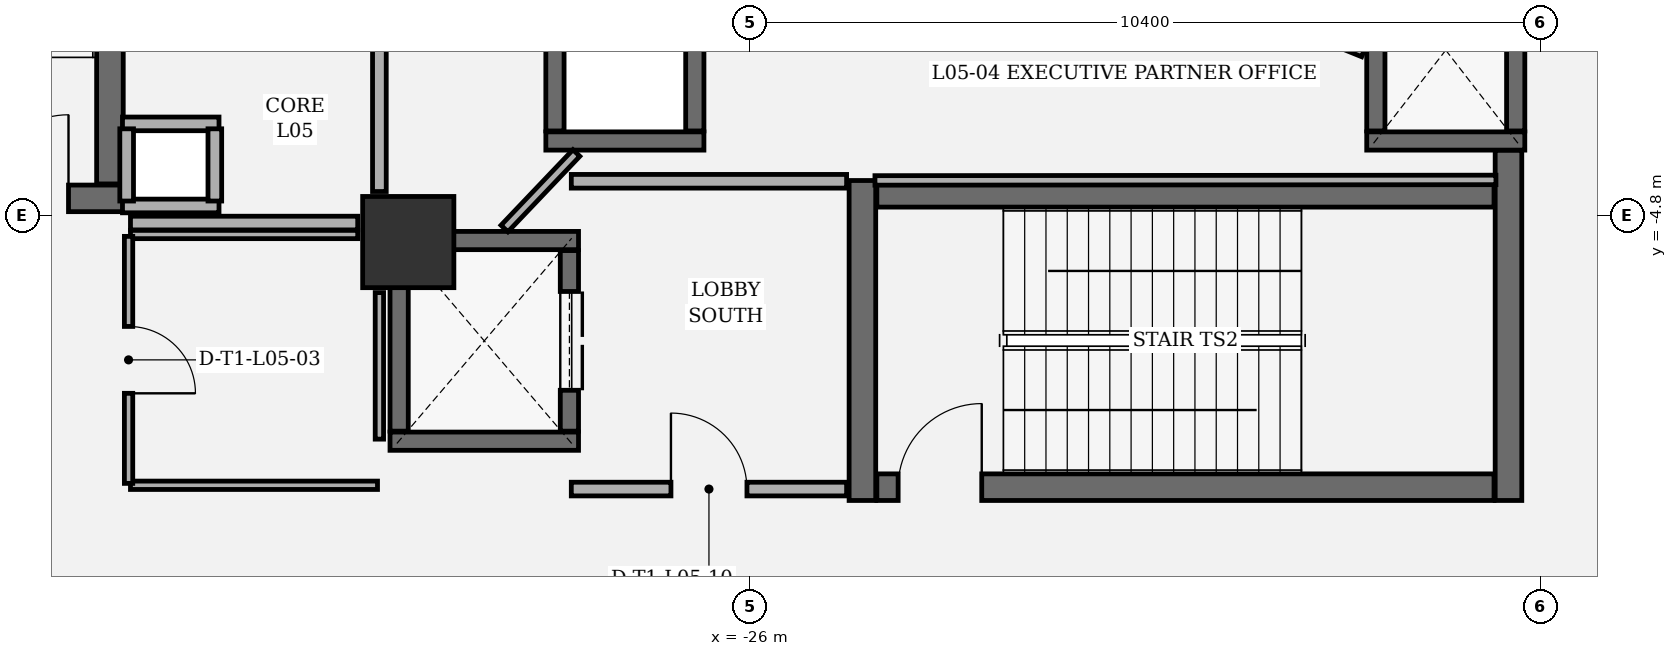
"""IFC4 building model, lengths in metres.
Left out: names, types, materials, properties, quantities, classifications, styles, units other than length and angle.
Written with IfcOpenShell. Run it as: python <this file> out.ifc"""

import sys

from ifc_helpers import new_model, si_unit, direction, frame, frame_2d, origin, origin_2d, place, context, subcontext, project, spatial, rectangle, extrude, element, fill, save


model = new_model("IFC4")
c1 = context("Model", 3, precision=1e-05, world=origin(), true_north=direction((0.0, 1.0)))
c2 = subcontext(c1, "Body", "Model", "MODEL_VIEW")
j1 = project(units=[si_unit("LENGTHUNIT", "METRE"), si_unit("PLANEANGLEUNIT", "RADIAN")], contexts=[c1])
p1 = place(None, origin())
s1 = spatial("IfcSite", under=j1, at=p1, CompositionType="ELEMENT")
p2 = place(p1, origin())
s2 = spatial("IfcBuilding", under=s1, at=p2, CompositionType="ELEMENT")
p3 = place(p2, frame((0.0, 0.0, 27.0)))
s3 = spatial("IfcBuildingStorey", under=s2, at=p3, CompositionType="ELEMENT", Elevation=27.0)
p4 = place(p3, frame((-30.5, -5.15, 0.0), z_axis=(0.0, 0.0, 1.0), x_axis=(1.0, 0.0, 0.0)))
e1 = element("IfcColumn", 1, at=p4, inside=s3, PredefinedType="COLUMN", context=c2, shape_type="SweptSolid", body=[
    extrude(rectangle(XDim=1.2, YDim=1.2, at=origin_2d()), origin(), (0.0, 0.0, 1.0), 5.4),
])
p5 = place(p3, frame((-13.635, -37.094, 0.0), z_axis=(0.0, 0.0, 1.0), x_axis=(-0.842602364841, 0.538536214905, 0.0)))
e2 = element("IfcWall", 2, at=p5, inside=s3, PredefinedType="SOLIDWALL", context=c2, shape_type="SweptSolid", body=[
    extrude(rectangle(XDim=60.27, YDim=0.38, at=frame_2d((30.135, 0.0))), origin(), (0.0, 0.0, 1.0), 5.12),
])
p6 = place(p5, frame((29.435, 0.0, 0.8)))
e3 = element("IfcOpeningElement", 3, at=p6, cuts=e2, PredefinedType="OPENING", context=c2, shape_type="SweptSolid", body=[
    extrude(rectangle(XDim=1.4, YDim=1.5, at=frame_2d((0.7, 0.75))), frame((0.0, 0.2, 0.0), z_axis=(0.0, -1.0, 0.0), x_axis=(1.0, 0.0, 0.0)), (0.0, 0.0, 1.0), 0.4),
])
p7 = place(p3, frame((-24.525, -4.34, 0.0), z_axis=(0.0, 0.0, 1.0), x_axis=(0.0, -1.0, 0.0)))
e4 = element("IfcWall", 4, at=p7, inside=s3, PredefinedType="SHEAR", context=c2, shape_type="SweptSolid", body=[
    extrude(rectangle(XDim=4.21, YDim=0.35, at=frame_2d((2.105, 0.0))), origin(), (0.0, 0.0, 1.0), 5.12),
])
p8 = place(p3, frame((-16.025, -8.55, 0.0), z_axis=(0.0, 0.0, 1.0), x_axis=(0.0, 1.0, 0.0)))
e5 = element("IfcWall", 5, at=p8, inside=s3, PredefinedType="SHEAR", context=c2, shape_type="SweptSolid", body=[
    extrude(rectangle(XDim=4.61, YDim=0.35, at=frame_2d((2.305, 0.0))), origin(), (0.0, 0.0, 1.0), 5.12),
])
p9 = place(p3, frame((-24.335, -8.375, 0.0), z_axis=(0.0, 0.0, 1.0), x_axis=(1.0, 0.0, 0.0)))
e6 = element("IfcWall", 6, at=p9, inside=s3, PredefinedType="SHEAR", context=c2, shape_type="SweptSolid", body=[
    extrude(rectangle(XDim=8.12, YDim=0.35, at=frame_2d((4.06, 0.0))), origin(), (0.0, 0.0, 1.0), 5.12),
])
p10 = place(p9, frame((0.28, 0.0, 0.0)))
e7 = element("IfcOpeningElement", 7, at=p10, cuts=e6, PredefinedType="OPENING", context=c2, shape_type="SweptSolid", body=[
    extrude(rectangle(XDim=1.1, YDim=2.2, at=frame_2d((0.55, 1.1))), frame((0.0, 0.185, 0.0), z_axis=(0.0, -1.0, 0.0), x_axis=(1.0, 0.0, 0.0)), (0.0, 0.0, 1.0), 0.37),
])
p11 = place(p3, frame((-16.215, -4.515, 0.0), z_axis=(0.0, 0.0, 1.0), x_axis=(-1.0, 0.0, 0.0)))
e8 = element("IfcWall", 8, at=p11, inside=s3, PredefinedType="SHEAR", context=c2, shape_type="SweptSolid", body=[
    extrude(rectangle(XDim=8.12, YDim=0.35, at=frame_2d((4.06, 0.0))), origin(), (0.0, 0.0, 1.0), 5.12),
])
p12 = place(p3, frame((-38.46, -4.575, 0.0), z_axis=(0.0, 0.0, 1.0), x_axis=(1.0, 0.0, 0.0)))
e9 = element("IfcWall", 9, at=p12, inside=s3, PredefinedType="SHEAR", context=c2, shape_type="SweptSolid", body=[
    extrude(rectangle(XDim=4.21, YDim=0.35, at=frame_2d((2.105, 0.0))), origin(), (0.0, 0.0, 1.0), 5.12),
])
p13 = place(p12, frame((2.39, 0.0, 0.0)))
e10 = element("IfcOpeningElement", 10, at=p13, cuts=e9, PredefinedType="OPENING", context=c2, shape_type="SweptSolid", body=[
    extrude(rectangle(XDim=1.1, YDim=2.2, at=frame_2d((0.55, 1.1))), frame((0.0, 0.185, 0.0), z_axis=(0.0, -1.0, 0.0), x_axis=(1.0, 0.0, 0.0)), (0.0, 0.0, 1.0), 0.37),
])
p14 = place(p3, frame((-34.425, -4.385, 0.0), z_axis=(0.0, 0.0, 1.0), x_axis=(0.0, 1.0, 0.0)))
e11 = element("IfcWall", 11, at=p14, inside=s3, PredefinedType="SHEAR", context=c2, shape_type="SweptSolid", body=[
    extrude(rectangle(XDim=8.77, YDim=0.35, at=frame_2d((4.385, 0.0))), origin(), (0.0, 0.0, 1.0), 5.12),
])
for number, where, z_axis, x_axis in (
    (12, (-28.26, -7.77, 0.0), (0.0, 0.0, 1.0), (-1.0, 0.0, 0.0)),
    (13, (-30.74, -5.13, 0.0), (0.0, 0.0, 1.0), (1.0, 0.0, 0.0)),
):
    element("IfcWall", number, at=place(p3, frame(where, z_axis=z_axis, x_axis=x_axis)), inside=s3, PredefinedType="SHEAR", context=c2, shape_type="SweptSolid", body=[
        extrude(rectangle(XDim=2.48, YDim=0.24, at=frame_2d((1.24, 0.0))), origin(), (0.0, 0.0, 1.0), 5.12),
    ])
p15 = place(p3, frame((-30.62, -7.638, 0.0), z_axis=(0.0, 0.0, 1.0), x_axis=(0.0, 1.0, 0.0)))
e14 = element("IfcWall", 14, at=p15, inside=s3, PredefinedType="SHEAR", context=c2, shape_type="SweptSolid", body=[
    extrude(rectangle(XDim=2.376, YDim=0.24, at=frame_2d((1.188, 0.0))), origin(), (0.0, 0.0, 1.0), 5.12),
])
p16 = place(p3, frame((-28.38, -5.262, 0.0), z_axis=(0.0, 0.0, 1.0), x_axis=(0.0, -1.0, 0.0)))
e15 = element("IfcWall", 15, at=p16, inside=s3, PredefinedType="SHEAR", context=c2, shape_type="SweptSolid", body=[
    extrude(rectangle(XDim=2.376, YDim=0.24, at=frame_2d((1.188, 0.0))), origin(), (0.0, 0.0, 1.0), 5.12),
])
p17 = place(p16, frame((0.538, 0.0, 0.0)))
e16 = element("IfcOpeningElement", 16, at=p17, cuts=e15, PredefinedType="OPENING", context=c2, shape_type="SweptSolid", body=[
    extrude(rectangle(XDim=1.3, YDim=2.3, at=frame_2d((0.65, 1.15))), frame((0.0, 0.13, 0.0), z_axis=(0.0, -1.0, 0.0), x_axis=(1.0, 0.0, 0.0)), (0.0, 0.0, 1.0), 0.26),
])
p18 = place(p3, frame((-26.61, -3.82, 0.0), z_axis=(0.0, 0.0, 1.0), x_axis=(-1.0, 0.0, 0.0)))
e17 = element("IfcWall", 17, at=p18, inside=s3, PredefinedType="SHEAR", context=c2, shape_type="SweptSolid", body=[
    extrude(rectangle(XDim=2.08, YDim=0.24, at=frame_2d((1.04, 0.0))), origin(), (0.0, 0.0, 1.0), 5.12),
])
for number, where, z_axis, x_axis in (
    (18, (-28.57, -3.688, 0.0), (0.0, 0.0, 1.0), (0.0, 1.0, 0.0)),
    (19, (-26.73, -1.562, 0.0), (0.0, 0.0, 1.0), (0.0, -1.0, 0.0)),
):
    element("IfcWall", number, at=place(p3, frame(where, z_axis=z_axis, x_axis=x_axis)), inside=s3, PredefinedType="SHEAR", context=c2, shape_type="SweptSolid", body=[
        extrude(rectangle(XDim=2.126, YDim=0.24, at=frame_2d((1.063, 0.0))), origin(), (0.0, 0.0, 1.0), 5.12),
    ])
p19 = place(p3, frame((-15.81, -3.82, 0.0), z_axis=(0.0, 0.0, 1.0), x_axis=(-1.0, 0.0, 0.0)))
e20 = element("IfcWall", 20, at=p19, inside=s3, PredefinedType="SHEAR", context=c2, shape_type="SweptSolid", body=[
    extrude(rectangle(XDim=2.08, YDim=0.24, at=frame_2d((1.04, 0.0))), origin(), (0.0, 0.0, 1.0), 5.12),
])
for number, where, z_axis, x_axis in (
    (21, (-17.77, -3.688, 0.0), (0.0, 0.0, 1.0), (0.0, 1.0, 0.0)),
    (22, (-15.93, -1.562, 0.0), (0.0, 0.0, 1.0), (0.0, -1.0, 0.0)),
):
    element("IfcWall", number, at=place(p3, frame(where, z_axis=z_axis, x_axis=x_axis)), inside=s3, PredefinedType="SHEAR", context=c2, shape_type="SweptSolid", body=[
        extrude(rectangle(XDim=2.126, YDim=0.24, at=frame_2d((1.063, 0.0))), origin(), (0.0, 0.0, 1.0), 5.12),
    ])
for number, where, z_axis, x_axis in (
    (23, (-32.99, -4.675, 0.0), (0.0, 0.0, 1.0), (-1.0, 0.0, 0.0)),
    (24, (-34.26, -3.595, 0.0), (0.0, 0.0, 1.0), (1.0, 0.0, 0.0)),
):
    element("IfcWall", number, at=place(p3, frame(where, z_axis=z_axis, x_axis=x_axis)), inside=s3, PredefinedType="PARTITIONING", context=c2, shape_type="SweptSolid", body=[
        extrude(rectangle(XDim=1.27, YDim=0.18, at=frame_2d((0.635, 0.0))), origin(), (0.0, 0.0, 1.0), 5.12),
    ])
for number, where, z_axis, x_axis in (
    (25, (-34.205, -4.61, 0.0), (0.0, 0.0, 1.0), (0.0, 1.0, 0.0)),
    (26, (-33.045, -3.66, 0.0), (0.0, 0.0, 1.0), (0.0, -1.0, 0.0)),
):
    element("IfcWall", number, at=place(p3, frame(where, z_axis=z_axis, x_axis=x_axis)), inside=s3, PredefinedType="PARTITIONING", context=c2, shape_type="SweptSolid", body=[
        extrude(rectangle(XDim=0.95, YDim=0.18, at=frame_2d((0.475, 0.0))), origin(), (0.0, 0.0, 1.0), 5.12),
    ])
p20 = place(p3, frame((-28.355, -8.4, 0.0), z_axis=(0.0, 0.0, 1.0), x_axis=(1.0, 0.0, 0.0)))
e27 = element("IfcWall", 27, at=p20, inside=s3, PredefinedType="PARTITIONING", context=c2, shape_type="SweptSolid", body=[
    extrude(rectangle(XDim=3.622, YDim=0.18, at=frame_2d((1.811, 0.0))), origin(), (0.0, 0.0, 1.0), 5.12),
])
p21 = place(p20, frame((1.311, 0.0, 0.0)))
e28 = element("IfcOpeningElement", 28, at=p21, cuts=e27, PredefinedType="OPENING", context=c2, shape_type="SweptSolid", body=[
    extrude(rectangle(XDim=1.0, YDim=2.15, at=frame_2d((0.5, 1.075))), frame((0.0, 0.1, 0.0), z_axis=(0.0, -1.0, 0.0), x_axis=(1.0, 0.0, 0.0)), (0.0, 0.0, 1.0), 0.2),
])
p22 = place(p3, frame((-24.733, -4.35, 0.0), z_axis=(0.0, 0.0, 1.0), x_axis=(-1.0, 0.0, 0.0)))
e29 = element("IfcWall", 29, at=p22, inside=s3, PredefinedType="PARTITIONING", context=c2, shape_type="SweptSolid", body=[
    extrude(rectangle(XDim=3.622, YDim=0.18, at=frame_2d((1.811, 0.0))), origin(), (0.0, 0.0, 1.0), 5.12),
])
p23 = place(p3, frame((-34.155, -8.35, 0.0), z_axis=(0.0, 0.0, 1.0), x_axis=(1.0, 0.0, 0.0)))
e30 = element("IfcWall", 30, at=p23, inside=s3, PredefinedType="PARTITIONING", context=c2, shape_type="SweptSolid", body=[
    extrude(rectangle(XDim=3.25, YDim=0.11, at=frame_2d((1.625, 0.0))), origin(), (0.0, 0.0, 1.0), 2.69),
])
p24 = place(p3, frame((-30.88, -7.743, 0.0), z_axis=(0.0, 0.0, 1.0), x_axis=(0.0, 1.0, 0.0)))
e31 = element("IfcWall", 31, at=p24, inside=s3, PredefinedType="PARTITIONING", context=c2, shape_type="SweptSolid", body=[
    extrude(rectangle(XDim=1.928, YDim=0.11, at=frame_2d((0.964, 0.0))), origin(), (0.0, 0.0, 1.0), 5.12),
])
p25 = place(p3, frame((-31.165, -5.05, 0.0), z_axis=(0.0, 0.0, 1.0), x_axis=(-1.0, 0.0, 0.0)))
e32 = element("IfcWall", 32, at=p25, inside=s3, PredefinedType="PARTITIONING", context=c2, shape_type="SweptSolid", body=[
    extrude(rectangle(XDim=2.99, YDim=0.11, at=frame_2d((1.495, 0.0))), origin(), (0.0, 0.0, 1.0), 5.12),
])
p26 = place(p3, frame((-34.18, -5.075, 0.0), z_axis=(0.0, 0.0, 1.0), x_axis=(0.0, -1.0, 0.0)))
e33 = element("IfcWall", 33, at=p26, inside=s3, PredefinedType="PARTITIONING", context=c2, shape_type="SweptSolid", body=[
    extrude(rectangle(XDim=3.25, YDim=0.11, at=frame_2d((1.625, 0.0))), origin(), (0.0, 0.0, 1.0), 5.12),
])
p27 = place(p26, frame((1.185, 0.0, 0.0)))
e34 = element("IfcOpeningElement", 34, at=p27, cuts=e33, PredefinedType="OPENING", context=c2, shape_type="SweptSolid", body=[
    extrude(rectangle(XDim=0.88, YDim=2.1, at=frame_2d((0.44, 1.05))), frame((0.0, 0.065, 0.0), z_axis=(0.0, -1.0, 0.0), x_axis=(1.0, 0.0, 0.0)), (0.0, 0.0, 1.0), 0.13),
])
p28 = place(p3, frame((-34.155, -4.9, 0.0), z_axis=(0.0, 0.0, 1.0), x_axis=(1.0, 0.0, 0.0)))
e35 = element("IfcWall", 35, at=p28, inside=s3, PredefinedType="PARTITIONING", context=c2, shape_type="SweptSolid", body=[
    extrude(rectangle(XDim=2.99, YDim=0.18, at=frame_2d((1.495, 0.0))), origin(), (0.0, 0.0, 1.0), 5.12),
])
p29 = place(p3, frame((-30.88, -4.485, 0.0), z_axis=(0.0, 0.0, 1.0), x_axis=(0.0, 1.0, 0.0)))
e36 = element("IfcWall", 36, at=p29, inside=s3, PredefinedType="PARTITIONING", context=c2, shape_type="SweptSolid", body=[
    extrude(rectangle(XDim=2.86, YDim=0.18, at=frame_2d((1.43, 0.0))), origin(), (0.0, 0.0, 1.0), 5.12),
])
p30 = place(p3, frame((-28.288, -3.978, 0.0), z_axis=(0.0, 0.0, 1.0), x_axis=(-0.689632952317, -0.724159092381, 0.0)))
e37 = element("IfcWall", 37, at=p30, inside=s3, PredefinedType="PARTITIONING", context=c2, shape_type="SweptSolid", body=[
    extrude(rectangle(XDim=1.372, YDim=0.125, at=frame_2d((0.686, 0.0))), origin(), (0.0, 0.0, 1.0), 5.12),
])
p31 = place(p3, frame((-24.36, -4.339, 0.0), z_axis=(0.0, 0.0, 1.0), x_axis=(0.999999674507, 0.000806836936, 0.0)))
e38 = element("IfcWall", 38, at=p31, inside=s3, PredefinedType="PARTITIONING", context=c2, shape_type="SweptSolid", body=[
    extrude(rectangle(XDim=8.17, YDim=0.125, at=frame_2d((4.085, 0.0))), origin(), (0.0, 0.0, 1.0), 5.12),
])
p32 = place(p3, frame((-17.933, -2.653, 0.0), z_axis=(0.0, 0.0, 1.0), x_axis=(-0.927181652453, 0.374612043792, 0.0)))
e39 = element("IfcWall", 39, at=p32, inside=s3, PredefinedType="PARTITIONING", context=c2, shape_type="SweptSolid", body=[
    extrude(rectangle(XDim=2.899, YDim=0.125, at=frame_2d((1.449, 0.0))), origin(), (0.0, 0.0, 1.0), 5.12),
])
p33 = place(p10, origin())
e40 = element("IfcDoor", 40, at=p33, inside=s3, OperationType="SINGLE_SWING_RIGHT", PredefinedType="DOOR", context=c2, shape_type="SweptSolid", body=[
    extrude(rectangle(XDim=1.1, YDim=2.2, at=frame_2d((0.55, 1.1))), frame((0.0, 0.025, 0.0), z_axis=(0.0, -1.0, 0.0), x_axis=(1.0, 0.0, 0.0)), (0.0, 0.0, 1.0), 0.05),
])
fill(e7, e40)
p34 = place(p13, origin())
e41 = element("IfcDoor", 41, at=p34, inside=s3, OperationType="SINGLE_SWING_RIGHT", PredefinedType="DOOR", context=c2, shape_type="SweptSolid", body=[
    extrude(rectangle(XDim=1.1, YDim=2.2, at=frame_2d((0.55, 1.1))), frame((0.0, 0.025, 0.0), z_axis=(0.0, -1.0, 0.0), x_axis=(1.0, 0.0, 0.0)), (0.0, 0.0, 1.0), 0.05),
])
fill(e10, e41)
p35 = place(p17, origin())
e42 = element("IfcDoor", 42, at=p35, inside=s3, OperationType="DOUBLE_DOOR_SLIDING", PredefinedType="DOOR", context=c2, shape_type="SweptSolid", body=[
    extrude(rectangle(XDim=1.3, YDim=2.3, at=frame_2d((0.65, 1.15))), frame((0.0, 0.025, 0.0), z_axis=(0.0, -1.0, 0.0), x_axis=(1.0, 0.0, 0.0)), (0.0, 0.0, 1.0), 0.05),
])
fill(e16, e42)
p36 = place(p27, origin())
e43 = element("IfcDoor", 43, at=p36, inside=s3, OperationType="SINGLE_SWING_RIGHT", PredefinedType="DOOR", context=c2, shape_type="SweptSolid", body=[
    extrude(rectangle(XDim=0.88, YDim=2.1, at=frame_2d((0.44, 1.05))), frame((0.0, 0.025, 0.0), z_axis=(0.0, -1.0, 0.0), x_axis=(1.0, 0.0, 0.0)), (0.0, 0.0, 1.0), 0.05),
])
fill(e34, e43)
p37 = place(p21, origin())
e44 = element("IfcDoor", 44, at=p37, inside=s3, OperationType="SINGLE_SWING_LEFT", PredefinedType="DOOR", context=c2, shape_type="SweptSolid", body=[
    extrude(rectangle(XDim=1.0, YDim=2.15, at=frame_2d((0.5, 1.075))), frame((0.0, 0.025, 0.0), z_axis=(0.0, -1.0, 0.0), x_axis=(1.0, 0.0, 0.0)), (0.0, 0.0, 1.0), 0.05),
])
fill(e28, e44)
save(model, sys.argv[1])
